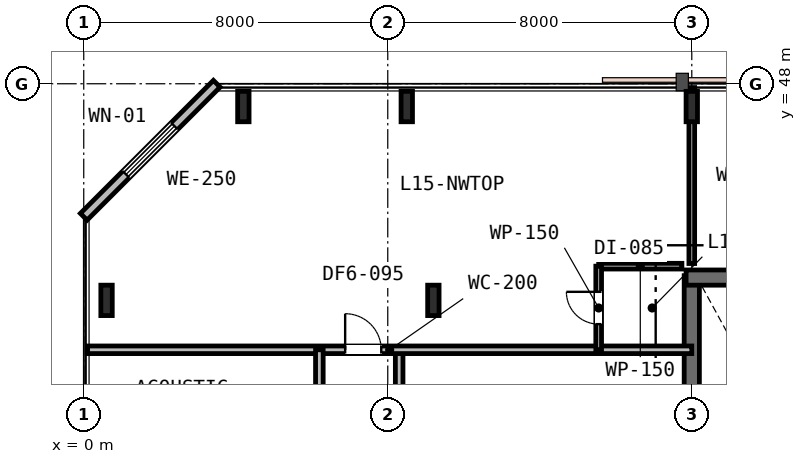
"""IFC4 building model, lengths in metres.
Left out: names, types, materials, properties, quantities, classifications, styles, units other than length and angle.
Written with IfcOpenShell. Run it as: python <this file> out.ifc"""

import sys

from ifc_helpers import new_model, si_unit, direction, frame, frame_2d, origin, origin_2d, place, context, subcontext, project, spatial, rectangle, i_section, extrude, element, fill, save


model = new_model("IFC4")
c1 = context("Model", 3, precision=1e-05, world=origin(), true_north=direction((0.0, 1.0)))
c2 = subcontext(c1, "Body", "Model", "MODEL_VIEW")
j1 = project(units=[si_unit("LENGTHUNIT", "METRE"), si_unit("PLANEANGLEUNIT", "RADIAN")], contexts=[c1])
p1 = place(None, origin())
s1 = spatial("IfcSite", under=j1, at=p1, CompositionType="ELEMENT")
p2 = place(p1, origin())
s2 = spatial("IfcBuilding", under=s1, at=p2, CompositionType="ELEMENT")
p3 = place(p2, frame((0.0, 0.0, 61.8)))
s3 = spatial("IfcBuildingStorey", under=s2, at=p3, CompositionType="ELEMENT", Elevation=61.8)
p4 = place(p3, frame((16.0, 30.65, 0.0), z_axis=(0.0, 0.0, 1.0), x_axis=(0.0, 1.0, 0.0)))
e1 = element("IfcWall", 1, at=p4, inside=s3, PredefinedType="SHEAR", context=c2, shape_type="SweptSolid", body=[
    extrude(rectangle(XDim=12.3, YDim=0.4, at=frame_2d((6.15, 0.0))), origin(), (0.0, 0.0, 1.0), 3.6),
])
p5 = place(p3, frame((15.85, 42.9, 0.0), z_axis=(0.0, 0.0, 1.0), x_axis=(1.0, 0.0, 0.0)))
e2 = element("IfcWall", 2, at=p5, inside=s3, PredefinedType="SHEAR", context=c2, shape_type="SweptSolid", body=[
    extrude(rectangle(XDim=24.3, YDim=0.4, at=frame_2d((12.15, 0.0))), origin(), (0.0, 0.0, 1.0), 3.6),
])
for number, where, z_axis, x_axis in (
    (3, (9.2, 42.3, 0.0), (0.0, 0.0, 1.0), (1.0, 0.0, 0.0)),
    (4, (0.6, 42.3, 0.0), (0.0, 0.0, 1.0), (1.0, 0.0, 0.0)),
    (5, (4.2, 47.4, 0.0), (0.0, 0.0, 1.0), (1.0, 0.0, 0.0)),
    (6, (8.5, 47.4, 0.0), (0.0, 0.0, 1.0), (1.0, 0.0, 0.0)),
    (7, (16.0, 47.4, 0.0), (0.0, 0.0, 1.0), (1.0, 0.0, 0.0)),
):
    element("IfcColumn", number, at=place(p3, frame(where, z_axis=z_axis, x_axis=x_axis)), inside=s3, PredefinedType="COLUMN", context=c2, shape_type="SweptSolid", body=[
        extrude(i_section(OverallWidth=0.3, OverallDepth=0.8, WebThickness=0.018, FlangeThickness=0.033, FilletRadius=0.03, at=origin_2d()), origin(), (0.0, 0.0, 1.0), 3.6),
    ])
p6 = place(p3, frame((3.5, 48.0, 0.0), z_axis=(0.0, 0.0, 1.0), x_axis=(-0.707106781187, -0.707106781187, 0.0)))
e8 = element("IfcWall", 8, at=p6, inside=s3, PredefinedType="STANDARD", context=c2, shape_type="SweptSolid", body=[
    extrude(rectangle(XDim=4.95, YDim=0.25, at=frame_2d((2.475, 0.0))), origin(), (0.0, 0.0, 1.0), 3.33),
])
p7 = place(p6, frame((1.575, 0.0, 0.75)))
e9 = element("IfcOpeningElement", 9, at=p7, cuts=e8, PredefinedType="OPENING", context=c2, shape_type="SweptSolid", body=[
    extrude(rectangle(XDim=1.8, YDim=1.85, at=frame_2d((0.9, 0.925))), frame((0.0, 0.135, 0.0), z_axis=(0.0, -1.0, 0.0), x_axis=(1.0, 0.0, 0.0)), (0.0, 0.0, 1.0), 0.27),
])
p8 = place(p3, frame((8.3, 30.8, 0.0), z_axis=(0.0, 0.0, 1.0), x_axis=(0.0, 1.0, 0.0)))
e10 = element("IfcWall", 10, at=p8, inside=s3, PredefinedType="PARTITIONING", context=c2, shape_type="SweptSolid", body=[
    extrude(rectangle(XDim=10.2, YDim=0.2, at=frame_2d((5.1, 0.0))), origin(), (0.0, 0.0, 1.0), 2.82),
])
p9 = place(p8, frame((1.95, 0.0, 0.0)))
e11 = element("IfcOpeningElement", 11, at=p9, cuts=e10, PredefinedType="OPENING", context=c2, shape_type="SweptSolid", body=[
    extrude(rectangle(XDim=0.9, YDim=2.15, at=frame_2d((0.45, 1.075))), frame((0.0, 0.11, 0.0), z_axis=(0.0, -1.0, 0.0), x_axis=(1.0, 0.0, 0.0)), (0.0, 0.0, 1.0), 0.22),
])
p10 = place(p8, frame((7.025, 0.0, 0.0)))
e12 = element("IfcOpeningElement", 12, at=p10, cuts=e10, PredefinedType="OPENING", context=c2, shape_type="SweptSolid", body=[
    extrude(rectangle(XDim=0.95, YDim=2.15, at=frame_2d((0.475, 1.075))), frame((0.0, 0.11, 0.0), z_axis=(0.0, -1.0, 0.0), x_axis=(1.0, 0.0, 0.0)), (0.0, 0.0, 1.0), 0.22),
])
p11 = place(p3, frame((0.1, 41.0, 0.0), z_axis=(0.0, 0.0, 1.0), x_axis=(1.0, 0.0, 0.0)))
e13 = element("IfcWall", 13, at=p11, inside=s3, PredefinedType="PARTITIONING", context=c2, shape_type="SweptSolid", body=[
    extrude(rectangle(XDim=15.9, YDim=0.2, at=frame_2d((7.95, 0.0))), origin(), (0.0, 0.0, 1.0), 2.82),
])
p12 = place(p11, frame((6.779, 0.0, 0.0)))
e14 = element("IfcOpeningElement", 14, at=p12, cuts=e13, PredefinedType="OPENING", context=c2, shape_type="SweptSolid", body=[
    extrude(rectangle(XDim=0.95, YDim=2.15, at=frame_2d((0.475, 1.075))), frame((0.0, 0.11, 0.0), z_axis=(0.0, -1.0, 0.0), x_axis=(1.0, 0.0, 0.0)), (0.0, 0.0, 1.0), 0.22),
])
p13 = place(p3, frame((13.55, 43.2, 0.0), z_axis=(0.0, 0.0, 1.0), x_axis=(1.0, 0.0, 0.0)))
e15 = element("IfcWall", 15, at=p13, inside=s3, PredefinedType="PARTITIONING", context=c2, shape_type="SweptSolid", body=[
    extrude(rectangle(XDim=2.19, YDim=0.15, at=frame_2d((1.095, 0.0))), origin(), (0.0, 0.0, 1.0), 3.33),
])
p14 = place(p3, frame((13.55, 41.0, 0.0), z_axis=(0.0, 0.0, 1.0), x_axis=(0.0, 1.0, 0.0)))
e16 = element("IfcWall", 16, at=p14, inside=s3, PredefinedType="PARTITIONING", context=c2, shape_type="SweptSolid", body=[
    extrude(rectangle(XDim=2.2, YDim=0.15, at=frame_2d((1.1, 0.0))), origin(), (0.0, 0.0, 1.0), 3.33),
])
p15 = place(p14, frame((0.675, 0.0, 0.0)))
e17 = element("IfcOpeningElement", 17, at=p15, cuts=e16, PredefinedType="OPENING", context=c2, shape_type="SweptSolid", body=[
    extrude(rectangle(XDim=0.85, YDim=2.15, at=frame_2d((0.425, 1.075))), frame((0.0, 0.085, 0.0), z_axis=(0.0, -1.0, 0.0), x_axis=(1.0, 0.0, 0.0)), (0.0, 0.0, 1.0), 0.17),
])
p16 = place(p3, frame((6.2, 28.6, 0.0), z_axis=(0.0, 0.0, 1.0), x_axis=(0.0, 1.0, 0.0)))
e18 = element("IfcWall", 18, at=p16, inside=s3, PredefinedType="PARTITIONING", context=c2, shape_type="SweptSolid", body=[
    extrude(rectangle(XDim=12.4, YDim=0.2, at=frame_2d((6.2, 0.0))), origin(), (0.0, 0.0, 1.0), 2.82),
])
p17 = place(p16, frame((3.182, 0.0, 0.0)))
e19 = element("IfcOpeningElement", 19, at=p17, cuts=e18, PredefinedType="OPENING", context=c2, shape_type="SweptSolid", body=[
    extrude(rectangle(XDim=0.95, YDim=2.15, at=frame_2d((0.475, 1.075))), frame((0.0, 0.11, 0.0), z_axis=(0.0, -1.0, 0.0), x_axis=(1.0, 0.0, 0.0)), (0.0, 0.0, 1.0), 0.22),
])
p18 = place(p16, frame((6.075, 0.0, 0.0)))
e20 = element("IfcOpeningElement", 20, at=p18, cuts=e18, PredefinedType="OPENING", context=c2, shape_type="SweptSolid", body=[
    extrude(rectangle(XDim=0.95, YDim=2.15, at=frame_2d((0.475, 1.075))), frame((0.0, 0.11, 0.0), z_axis=(0.0, -1.0, 0.0), x_axis=(1.0, 0.0, 0.0)), (0.0, 0.0, 1.0), 0.22),
])
p19 = place(p16, frame((8.966, 0.0, 0.0)))
e21 = element("IfcOpeningElement", 21, at=p19, cuts=e18, PredefinedType="OPENING", context=c2, shape_type="SweptSolid", body=[
    extrude(rectangle(XDim=0.95, YDim=2.15, at=frame_2d((0.475, 1.075))), frame((0.0, 0.11, 0.0), z_axis=(0.0, -1.0, 0.0), x_axis=(1.0, 0.0, 0.0)), (0.0, 0.0, 1.0), 0.22),
])
p20 = place(p3, frame((16.0, 43.27, 0.0), z_axis=(0.0, 0.0, 1.0), x_axis=(0.0, 1.0, 0.0)))
e22 = element("IfcWall", 22, at=p20, inside=s3, PredefinedType="PARTITIONING", context=c2, shape_type="SweptSolid", body=[
    extrude(rectangle(XDim=4.63, YDim=0.15, at=frame_2d((2.315, 0.0))), origin(), (0.0, 0.0, 1.0), 2.93),
])
p21 = place(p7, origin())
e23 = element("IfcWindow", 23, at=p21, inside=s3, PartitioningType="SINGLE_PANEL", PredefinedType="WINDOW", context=c2, shape_type="SweptSolid", body=[
    extrude(rectangle(XDim=1.8, YDim=1.85, at=frame_2d((0.9, 0.925))), frame((0.0, 0.03, 0.0), z_axis=(0.0, -1.0, 0.0), x_axis=(1.0, 0.0, 0.0)), (0.0, 0.0, 1.0), 0.06),
])
fill(e9, e23)
p22 = place(p12, origin())
e24 = element("IfcDoor", 24, at=p22, inside=s3, OperationType="SINGLE_SWING_LEFT", PredefinedType="DOOR", context=c2, shape_type="SweptSolid", body=[
    extrude(rectangle(XDim=0.95, YDim=2.15, at=frame_2d((0.475, 1.075))), frame((0.0, 0.025, 0.0), z_axis=(0.0, -1.0, 0.0), x_axis=(1.0, 0.0, 0.0)), (0.0, 0.0, 1.0), 0.05),
])
fill(e14, e24)
p23 = place(p15, origin())
e25 = element("IfcDoor", 25, at=p23, inside=s3, OperationType="SINGLE_SWING_RIGHT", PredefinedType="DOOR", context=c2, shape_type="SweptSolid", body=[
    extrude(rectangle(XDim=0.85, YDim=2.15, at=frame_2d((0.425, 1.075))), frame((0.0, 0.025, 0.0), z_axis=(0.0, -1.0, 0.0), x_axis=(1.0, 0.0, 0.0)), (0.0, 0.0, 1.0), 0.05),
])
fill(e17, e25)
save(model, sys.argv[1])
